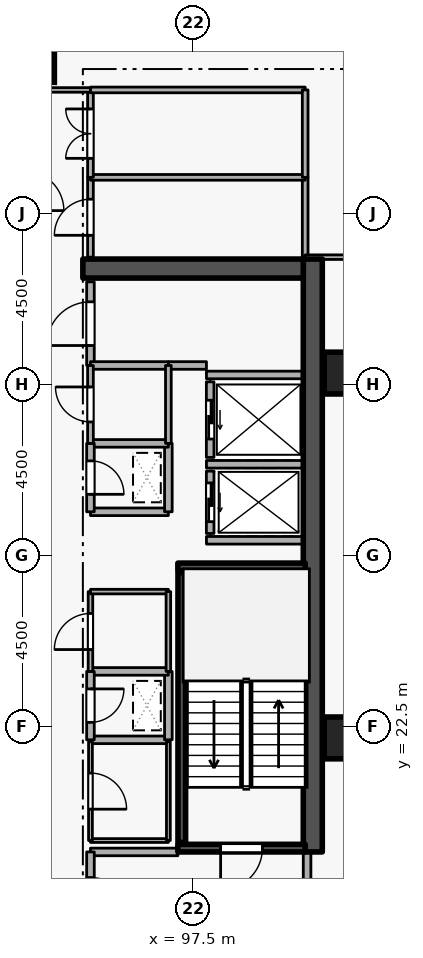
"""IFC4 building model, lengths in metres.
Left out: names, types, materials, properties, quantities, classifications, styles, units other than length and angle.
Written with IfcOpenShell. Run it as: python <this file> out.ifc"""

import sys

from ifc_helpers import new_model, si_unit, direction, frame, frame_2d, origin, origin_2d, place, context, subcontext, project, spatial, rectangle, extrude, element, fill, save


model = new_model("IFC4")
c1 = context("Model", 3, precision=1e-05, world=origin(), true_north=direction((0.0, 1.0)))
c2 = subcontext(c1, "Body", "Model", "MODEL_VIEW")
j1 = project(units=[si_unit("LENGTHUNIT", "METRE"), si_unit("PLANEANGLEUNIT", "RADIAN")], contexts=[c1])
p1 = place(None, origin())
s1 = spatial("IfcSite", under=j1, at=p1, CompositionType="ELEMENT")
p2 = place(p1, origin())
s2 = spatial("IfcBuilding", under=s1, at=p2, CompositionType="ELEMENT")
p3 = place(p2, frame((0.0, 0.0, 189.3)))
s3 = spatial("IfcBuildingStorey", under=s2, at=p3, CompositionType="ELEMENT", Elevation=189.3)
p4 = place(p3, frame((100.65, 19.2, 0.0), z_axis=(0.0, 0.0, 1.0), x_axis=(0.0, 1.0, 0.0)))
e1 = element("IfcWall", 1, at=p4, inside=s3, PredefinedType="SHEAR", context=c2, shape_type="SweptSolid", body=[
    extrude(rectangle(XDim=15.6, YDim=0.5, at=frame_2d((7.8, 0.0))), origin(), (0.0, 0.0, 1.0), 3.6),
])
p5 = place(p3, frame((94.6, 34.55, 0.0), z_axis=(0.0, 0.0, 1.0), x_axis=(1.0, 0.0, 0.0)))
e2 = element("IfcWall", 2, at=p5, inside=s3, PredefinedType="SHEAR", context=c2, shape_type="SweptSolid", body=[
    extrude(rectangle(XDim=5.8, YDim=0.5, at=frame_2d((2.9, 0.0))), origin(), (0.0, 0.0, 1.0), 3.6),
])
for number, where, z_axis, x_axis in (
    (3, (93.3, 40.0, 0.0), (0.0, 0.0, 1.0), (1.0, 0.0, 0.0)),
    (4, (101.5, 22.2, 0.0), (0.0, 0.0, 1.0), (1.0, 0.0, 0.0)),
    (5, (101.5, 31.8, 0.0), (0.0, 0.0, 1.0), (1.0, 0.0, 0.0)),
):
    element("IfcColumn", number, at=place(p3, frame(where, z_axis=z_axis, x_axis=x_axis)), inside=s3, PredefinedType="COLUMN", context=c2, shape_type="SweptSolid", body=[
        extrude(rectangle(XDim=1.1, YDim=1.1, at=origin_2d()), origin(), (0.0, 0.0, 1.0), 3.6),
    ])
p6 = place(p3, frame((97.95, 29.22, 0.0), z_axis=(0.0, 0.0, 1.0), x_axis=(0.0, -1.0, 0.0)))
e6 = element("IfcWall", 6, at=p6, inside=s3, PredefinedType="STANDARD", context=c2, shape_type="SweptSolid", body=[
    extrude(rectangle(XDim=1.64, YDim=0.2, at=frame_2d((0.82, 0.0))), origin(), (0.0, 0.0, 1.0), 3.34),
])
p7 = place(p6, frame((0.31, 0.0, 0.0)))
e7 = element("IfcOpeningElement", 7, at=p7, cuts=e6, PredefinedType="OPENING", context=c2, shape_type="SweptSolid", body=[
    extrude(rectangle(XDim=1.02, YDim=2.06, at=frame_2d((0.51, 1.03))), frame((0.0, 0.11, 0.0), z_axis=(0.0, -1.0, 0.0), x_axis=(1.0, 0.0, 0.0)), (0.0, 0.0, 1.0), 0.22),
])
p8 = place(p3, frame((97.95, 31.57, 0.0), z_axis=(0.0, 0.0, 1.0), x_axis=(0.0, -1.0, 0.0)))
e8 = element("IfcWall", 8, at=p8, inside=s3, PredefinedType="STANDARD", context=c2, shape_type="SweptSolid", body=[
    extrude(rectangle(XDim=1.99, YDim=0.2, at=frame_2d((0.995, 0.0))), origin(), (0.0, 0.0, 1.0), 3.34),
])
p9 = place(p8, frame((0.485, 0.0, 0.0)))
e9 = element("IfcOpeningElement", 9, at=p9, cuts=e8, PredefinedType="OPENING", context=c2, shape_type="SweptSolid", body=[
    extrude(rectangle(XDim=1.02, YDim=2.06, at=frame_2d((0.51, 1.03))), frame((0.0, 0.11, 0.0), z_axis=(0.0, -1.0, 0.0), x_axis=(1.0, 0.0, 0.0)), (0.0, 0.0, 1.0), 0.22),
])
for number, where, z_axis, x_axis in (
    (10, (97.852, 29.4, 0.0), (0.0, 0.0, 1.0), (1.0, 0.0, 0.0)),
    (11, (97.852, 27.4, 0.0), (0.0, 0.0, 1.0), (1.0, 0.0, 0.0)),
    (12, (97.852, 31.75, 0.0), (0.0, 0.0, 1.0), (1.0, 0.0, 0.0)),
):
    element("IfcWall", number, at=place(p3, frame(where, z_axis=z_axis, x_axis=x_axis)), inside=s3, PredefinedType="STANDARD", context=c2, shape_type="SweptSolid", body=[
        extrude(rectangle(XDim=2.536, YDim=0.2, at=frame_2d((1.268, 0.0))), origin(), (0.0, 0.0, 1.0), 3.34),
    ])
p10 = place(p3, frame((100.45, 19.3, 0.0), z_axis=(0.0, 0.0, 1.0), x_axis=(-1.0, 0.0, 0.0)))
e13 = element("IfcWall", 13, at=p10, inside=s3, PredefinedType="SHEAR", context=c2, shape_type="SweptSolid", body=[
    extrude(rectangle(XDim=3.35, YDim=0.2, at=frame_2d((1.675, 0.0))), origin(), (0.0, 0.0, 1.0), 3.6),
])
p11 = place(p10, frame((1.125, 0.0, 0.0)))
e14 = element("IfcOpeningElement", 14, at=p11, cuts=e13, PredefinedType="OPENING", context=c2, shape_type="SweptSolid", body=[
    extrude(rectangle(XDim=1.1, YDim=2.1, at=frame_2d((0.55, 1.05))), frame((0.0, 0.11, 0.0), z_axis=(0.0, -1.0, 0.0), x_axis=(1.0, 0.0, 0.0)), (0.0, 0.0, 1.0), 0.22),
])
p12 = place(p3, frame((97.1, 26.7, 0.0), z_axis=(0.0, 0.0, 1.0), x_axis=(1.0, 0.0, 0.0)))
e15 = element("IfcWall", 15, at=p12, inside=s3, PredefinedType="SHEAR", context=c2, shape_type="SweptSolid", body=[
    extrude(rectangle(XDim=3.35, YDim=0.2, at=frame_2d((1.675, 0.0))), origin(), (0.0, 0.0, 1.0), 3.6),
])
p13 = place(p3, frame((97.203, 26.55, 0.0), z_axis=(0.0, 0.0, 1.0), x_axis=(0.0, -1.0, 0.0)))
e16 = element("IfcWall", 16, at=p13, inside=s3, PredefinedType="SHEAR", context=c2, shape_type="SweptSolid", body=[
    extrude(rectangle(XDim=7.1, YDim=0.2, at=frame_2d((3.55, 0.0))), origin(), (0.0, 0.0, 1.0), 3.6),
])
p14 = place(p3, frame((100.5, 16.7, 0.0), z_axis=(0.0, 0.0, 1.0), x_axis=(0.0, 1.0, 0.0)))
e17 = element("IfcWall", 17, at=p14, inside=s3, PredefinedType="STANDARD", context=c2, shape_type="SweptSolid", body=[
    extrude(rectangle(XDim=2.5, YDim=0.2, at=frame_2d((1.25, 0.0))), origin(), (0.0, 0.0, 1.0), 3.34),
])
p15 = place(p3, frame((97.1, 19.2, 0.0), z_axis=(0.0, 0.0, 1.0), x_axis=(-1.0, 0.0, 0.0)))
e18 = element("IfcWall", 18, at=p15, inside=s3, PredefinedType="STANDARD", context=c2, shape_type="SweptSolid", body=[
    extrude(rectangle(XDim=2.3, YDim=0.2, at=frame_2d((1.15, 0.0))), origin(), (0.0, 0.0, 1.0), 2.545),
])
p16 = place(p3, frame((94.8, 19.2, 0.0), z_axis=(0.0, 0.0, 1.0), x_axis=(0.0, -1.0, 0.0)))
e19 = element("IfcWall", 19, at=p16, inside=s3, PredefinedType="STANDARD", context=c2, shape_type="SweptSolid", body=[
    extrude(rectangle(XDim=2.5, YDim=0.2, at=frame_2d((1.25, 0.0))), origin(), (0.0, 0.0, 1.0), 3.34),
])
p17 = place(p16, frame((0.675, 0.0, 0.0)))
e20 = element("IfcOpeningElement", 20, at=p17, cuts=e19, PredefinedType="OPENING", context=c2, shape_type="SweptSolid", body=[
    extrude(rectangle(XDim=1.15, YDim=2.1, at=frame_2d((0.575, 1.05))), frame((0.0, 0.11, 0.0), z_axis=(0.0, -1.0, 0.0), x_axis=(1.0, 0.0, 0.0)), (0.0, 0.0, 1.0), 0.22),
])
p18 = place(p3, frame((94.8, 28.15, 0.0), z_axis=(0.0, 0.0, 1.0), x_axis=(1.0, 0.0, 0.0)))
e21 = element("IfcWall", 21, at=p18, inside=s3, PredefinedType="STANDARD", context=c2, shape_type="SweptSolid", body=[
    extrude(rectangle(XDim=2.05, YDim=0.2, at=frame_2d((1.025, 0.0))), origin(), (0.0, 0.0, 1.0), 3.34),
])
p19 = place(p3, frame((96.85, 28.15, 0.0), z_axis=(0.0, 0.0, 1.0), x_axis=(0.0, 1.0, 0.0)))
e22 = element("IfcWall", 22, at=p19, inside=s3, PredefinedType="STANDARD", context=c2, shape_type="SweptSolid", body=[
    extrude(rectangle(XDim=1.8, YDim=0.2, at=frame_2d((0.9, 0.0))), origin(), (0.0, 0.0, 1.0), 3.34),
])
p20 = place(p3, frame((96.85, 29.95, 0.0), z_axis=(0.0, 0.0, 1.0), x_axis=(-1.0, 0.0, 0.0)))
e23 = element("IfcWall", 23, at=p20, inside=s3, PredefinedType="STANDARD", context=c2, shape_type="SweptSolid", body=[
    extrude(rectangle(XDim=2.05, YDim=0.2, at=frame_2d((1.025, 0.0))), origin(), (0.0, 0.0, 1.0), 3.34),
])
p21 = place(p3, frame((94.8, 29.95, 0.0), z_axis=(0.0, 0.0, 1.0), x_axis=(0.0, -1.0, 0.0)))
e24 = element("IfcWall", 24, at=p21, inside=s3, PredefinedType="STANDARD", context=c2, shape_type="SweptSolid", body=[
    extrude(rectangle(XDim=1.8, YDim=0.2, at=frame_2d((0.9, 0.0))), origin(), (0.0, 0.0, 1.0), 3.34),
])
p22 = place(p21, frame((0.46, 0.0, 0.0)))
e25 = element("IfcOpeningElement", 25, at=p22, cuts=e24, PredefinedType="OPENING", context=c2, shape_type="SweptSolid", body=[
    extrude(rectangle(XDim=0.88, YDim=2.04, at=frame_2d((0.44, 1.02))), frame((0.0, 0.11, 0.0), z_axis=(0.0, -1.0, 0.0), x_axis=(1.0, 0.0, 0.0)), (0.0, 0.0, 1.0), 0.22),
])
p23 = place(p3, frame((94.8, 22.15, 0.0), z_axis=(0.0, 0.0, 1.0), x_axis=(1.0, 0.0, 0.0)))
e26 = element("IfcWall", 26, at=p23, inside=s3, PredefinedType="STANDARD", context=c2, shape_type="SweptSolid", body=[
    extrude(rectangle(XDim=2.05, YDim=0.2, at=frame_2d((1.025, 0.0))), origin(), (0.0, 0.0, 1.0), 3.34),
])
p24 = place(p3, frame((96.85, 22.15, 0.0), z_axis=(0.0, 0.0, 1.0), x_axis=(0.0, 1.0, 0.0)))
e27 = element("IfcWall", 27, at=p24, inside=s3, PredefinedType="STANDARD", context=c2, shape_type="SweptSolid", body=[
    extrude(rectangle(XDim=1.8, YDim=0.2, at=frame_2d((0.9, 0.0))), origin(), (0.0, 0.0, 1.0), 3.34),
])
p25 = place(p3, frame((96.85, 23.95, 0.0), z_axis=(0.0, 0.0, 1.0), x_axis=(-1.0, 0.0, 0.0)))
e28 = element("IfcWall", 28, at=p25, inside=s3, PredefinedType="STANDARD", context=c2, shape_type="SweptSolid", body=[
    extrude(rectangle(XDim=2.05, YDim=0.2, at=frame_2d((1.025, 0.0))), origin(), (0.0, 0.0, 1.0), 3.34),
])
p26 = place(p3, frame((94.8, 23.95, 0.0), z_axis=(0.0, 0.0, 1.0), x_axis=(0.0, -1.0, 0.0)))
e29 = element("IfcWall", 29, at=p26, inside=s3, PredefinedType="STANDARD", context=c2, shape_type="SweptSolid", body=[
    extrude(rectangle(XDim=1.8, YDim=0.2, at=frame_2d((0.9, 0.0))), origin(), (0.0, 0.0, 1.0), 3.34),
])
p27 = place(p26, frame((0.46, 0.0, 0.0)))
e30 = element("IfcOpeningElement", 30, at=p27, cuts=e29, PredefinedType="OPENING", context=c2, shape_type="SweptSolid", body=[
    extrude(rectangle(XDim=0.88, YDim=2.04, at=frame_2d((0.44, 1.02))), frame((0.0, 0.11, 0.0), z_axis=(0.0, -1.0, 0.0), x_axis=(1.0, 0.0, 0.0)), (0.0, 0.0, 1.0), 0.22),
])
p28 = place(p3, frame((94.8, 32.0, 0.0), z_axis=(0.0, 0.0, 1.0), x_axis=(0.0, 1.0, 0.0)))
e31 = element("IfcWall", 31, at=p28, inside=s3, PredefinedType="STANDARD", context=c2, shape_type="SweptSolid", body=[
    extrude(rectangle(XDim=2.2, YDim=0.2, at=frame_2d((1.1, 0.0))), origin(), (0.0, 0.0, 1.0), 3.34),
])
p29 = place(p28, frame((0.525, 0.0, 0.0)))
e32 = element("IfcOpeningElement", 32, at=p29, cuts=e31, PredefinedType="OPENING", context=c2, shape_type="SweptSolid", body=[
    extrude(rectangle(XDim=1.15, YDim=2.1, at=frame_2d((0.575, 1.05))), frame((0.0, 0.11, 0.0), z_axis=(0.0, -1.0, 0.0), x_axis=(1.0, 0.0, 0.0)), (0.0, 0.0, 1.0), 0.22),
])
p30 = place(p3, frame((97.852, 32.0, 0.0), z_axis=(0.0, 0.0, 1.0), x_axis=(-1.0, 0.0, 0.0)))
e33 = element("IfcWall", 33, at=p30, inside=s3, PredefinedType="STANDARD", context=c2, shape_type="SweptSolid", body=[
    extrude(rectangle(XDim=1.002, YDim=0.2, at=frame_2d((0.501, 0.0))), origin(), (0.0, 0.0, 1.0), 3.34),
])
p31 = place(p3, frame((96.85, 32.0, 0.0), z_axis=(0.0, 0.0, 1.0), x_axis=(-1.0, 0.0, 0.0)))
e34 = element("IfcWall", 34, at=p31, inside=s3, PredefinedType="STANDARD", context=c2, shape_type="SweptSolid", body=[
    extrude(rectangle(XDim=2.05, YDim=0.2, at=frame_2d((1.025, 0.0))), origin(), (0.0, 0.0, 1.0), 3.34),
])
p32 = place(p3, frame((94.8, 19.5, 0.0), z_axis=(0.0, 0.0, 1.0), x_axis=(1.0, 0.0, 0.0)))
e35 = element("IfcWall", 35, at=p32, inside=s3, PredefinedType="PARTITIONING", context=c2, shape_type="SweptSolid", body=[
    extrude(rectangle(XDim=2.05, YDim=0.1, at=frame_2d((1.025, 0.0))), origin(), (0.0, 0.0, 1.0), 2.545),
])
p33 = place(p3, frame((96.85, 19.5, 0.0), z_axis=(0.0, 0.0, 1.0), x_axis=(0.0, 1.0, 0.0)))
e36 = element("IfcWall", 36, at=p33, inside=s3, PredefinedType="PARTITIONING", context=c2, shape_type="SweptSolid", body=[
    extrude(rectangle(XDim=2.6, YDim=0.1, at=frame_2d((1.3, 0.0))), origin(), (0.0, 0.0, 1.0), 3.34),
])
p34 = place(p3, frame((94.8, 22.1, 0.0), z_axis=(0.0, 0.0, 1.0), x_axis=(0.0, -1.0, 0.0)))
e37 = element("IfcWall", 37, at=p34, inside=s3, PredefinedType="PARTITIONING", context=c2, shape_type="SweptSolid", body=[
    extrude(rectangle(XDim=2.6, YDim=0.1, at=frame_2d((1.3, 0.0))), origin(), (0.0, 0.0, 1.0), 3.34),
])
p35 = place(p34, frame((0.825, 0.0, 0.0)))
e38 = element("IfcOpeningElement", 38, at=p35, cuts=e37, PredefinedType="OPENING", context=c2, shape_type="SweptSolid", body=[
    extrude(rectangle(XDim=0.95, YDim=2.1, at=frame_2d((0.475, 1.05))), frame((0.0, 0.06, 0.0), z_axis=(0.0, -1.0, 0.0), x_axis=(1.0, 0.0, 0.0)), (0.0, 0.0, 1.0), 0.12),
])
p36 = place(p3, frame((94.8, 23.95, 0.0), z_axis=(0.0, 0.0, 1.0), x_axis=(0.0, 1.0, 0.0)))
e39 = element("IfcWall", 39, at=p36, inside=s3, PredefinedType="PARTITIONING", context=c2, shape_type="SweptSolid", body=[
    extrude(rectangle(XDim=2.1, YDim=0.12, at=frame_2d((1.05, 0.0))), origin(), (0.0, 0.0, 1.0), 3.34),
])
p37 = place(p36, frame((0.575, 0.0, 0.0)))
e40 = element("IfcOpeningElement", 40, at=p37, cuts=e39, PredefinedType="OPENING", context=c2, shape_type="SweptSolid", body=[
    extrude(rectangle(XDim=0.95, YDim=2.1, at=frame_2d((0.475, 1.05))), frame((0.0, 0.07, 0.0), z_axis=(0.0, -1.0, 0.0), x_axis=(1.0, 0.0, 0.0)), (0.0, 0.0, 1.0), 0.14),
])
p38 = place(p3, frame((94.8, 26.05, 0.0), z_axis=(0.0, 0.0, 1.0), x_axis=(1.0, 0.0, 0.0)))
e41 = element("IfcWall", 41, at=p38, inside=s3, PredefinedType="PARTITIONING", context=c2, shape_type="SweptSolid", body=[
    extrude(rectangle(XDim=2.05, YDim=0.12, at=frame_2d((1.025, 0.0))), origin(), (0.0, 0.0, 1.0), 3.34),
])
p39 = place(p3, frame((96.85, 26.05, 0.0), z_axis=(0.0, 0.0, 1.0), x_axis=(0.0, -1.0, 0.0)))
e42 = element("IfcWall", 42, at=p39, inside=s3, PredefinedType="PARTITIONING", context=c2, shape_type="SweptSolid", body=[
    extrude(rectangle(XDim=2.1, YDim=0.12, at=frame_2d((1.05, 0.0))), origin(), (0.0, 0.0, 1.0), 3.34),
])
p40 = place(p3, frame((94.8, 29.95, 0.0), z_axis=(0.0, 0.0, 1.0), x_axis=(0.0, 1.0, 0.0)))
e43 = element("IfcWall", 43, at=p40, inside=s3, PredefinedType="PARTITIONING", context=c2, shape_type="SweptSolid", body=[
    extrude(rectangle(XDim=2.05, YDim=0.15, at=frame_2d((1.025, 0.0))), origin(), (0.0, 0.0, 1.0), 3.34),
])
p41 = place(p40, frame((0.565, 0.0, 0.0)))
e44 = element("IfcOpeningElement", 44, at=p41, cuts=e43, PredefinedType="OPENING", context=c2, shape_type="SweptSolid", body=[
    extrude(rectangle(XDim=0.92, YDim=2.08, at=frame_2d((0.46, 1.04))), frame((0.0, 0.085, 0.0), z_axis=(0.0, -1.0, 0.0), x_axis=(1.0, 0.0, 0.0)), (0.0, 0.0, 1.0), 0.17),
])
p42 = place(p3, frame((96.85, 32.0, 0.0), z_axis=(0.0, 0.0, 1.0), x_axis=(0.0, -1.0, 0.0)))
e45 = element("IfcWall", 45, at=p42, inside=s3, PredefinedType="PARTITIONING", context=c2, shape_type="SweptSolid", body=[
    extrude(rectangle(XDim=2.05, YDim=0.15, at=frame_2d((1.025, 0.0))), origin(), (0.0, 0.0, 1.0), 3.34),
])
p43 = place(p3, frame((100.45, 36.95, 0.0), z_axis=(0.0, 0.0, 1.0), x_axis=(0.0, -1.0, 0.0)))
e46 = element("IfcWall", 46, at=p43, inside=s3, PredefinedType="PARTITIONING", context=c2, shape_type="SweptSolid", body=[
    extrude(rectangle(XDim=2.1, YDim=0.15, at=frame_2d((1.05, 0.0))), origin(), (0.0, 0.0, 1.0), 3.34),
])
p44 = place(p3, frame((94.8, 34.85, 0.0), z_axis=(0.0, 0.0, 1.0), x_axis=(0.0, 1.0, 0.0)))
e47 = element("IfcWall", 47, at=p44, inside=s3, PredefinedType="PARTITIONING", context=c2, shape_type="SweptSolid", body=[
    extrude(rectangle(XDim=2.1, YDim=0.15, at=frame_2d((1.05, 0.0))), origin(), (0.0, 0.0, 1.0), 3.34),
])
p45 = place(p44, frame((0.575, 0.0, 0.0)))
e48 = element("IfcOpeningElement", 48, at=p45, cuts=e47, PredefinedType="OPENING", context=c2, shape_type="SweptSolid", body=[
    extrude(rectangle(XDim=0.95, YDim=2.1, at=frame_2d((0.475, 1.05))), frame((0.0, 0.085, 0.0), z_axis=(0.0, -1.0, 0.0), x_axis=(1.0, 0.0, 0.0)), (0.0, 0.0, 1.0), 0.17),
])
p46 = place(p3, frame((94.8, 36.95, 0.0), z_axis=(0.0, 0.0, 1.0), x_axis=(1.0, 0.0, 0.0)))
e49 = element("IfcWall", 49, at=p46, inside=s3, PredefinedType="PARTITIONING", context=c2, shape_type="SweptSolid", body=[
    extrude(rectangle(XDim=5.65, YDim=0.15, at=frame_2d((2.825, 0.0))), origin(), (0.0, 0.0, 1.0), 3.34),
])
p47 = place(p3, frame((94.8, 36.95, 0.0), z_axis=(0.0, 0.0, 1.0), x_axis=(0.0, 1.0, 0.0)))
e50 = element("IfcWall", 50, at=p47, inside=s3, PredefinedType="PARTITIONING", context=c2, shape_type="SweptSolid", body=[
    extrude(rectangle(XDim=2.3, YDim=0.15, at=frame_2d((1.15, 0.0))), origin(), (0.0, 0.0, 1.0), 3.34),
])
p48 = place(p47, frame((0.5, 0.0, 0.0)))
e51 = element("IfcOpeningElement", 51, at=p48, cuts=e50, PredefinedType="OPENING", context=c2, shape_type="SweptSolid", body=[
    extrude(rectangle(XDim=1.3, YDim=2.12, at=frame_2d((0.65, 1.06))), frame((0.0, 0.085, 0.0), z_axis=(0.0, -1.0, 0.0), x_axis=(1.0, 0.0, 0.0)), (0.0, 0.0, 1.0), 0.17),
])
p49 = place(p3, frame((94.8, 39.25, 0.0), z_axis=(0.0, 0.0, 1.0), x_axis=(1.0, 0.0, 0.0)))
e52 = element("IfcWall", 52, at=p49, inside=s3, PredefinedType="PARTITIONING", context=c2, shape_type="SweptSolid", body=[
    extrude(rectangle(XDim=5.65, YDim=0.15, at=frame_2d((2.825, 0.0))), origin(), (0.0, 0.0, 1.0), 3.34),
])
p50 = place(p3, frame((100.45, 39.25, 0.0), z_axis=(0.0, 0.0, 1.0), x_axis=(0.0, -1.0, 0.0)))
e53 = element("IfcWall", 53, at=p50, inside=s3, PredefinedType="PARTITIONING", context=c2, shape_type="SweptSolid", body=[
    extrude(rectangle(XDim=2.3, YDim=0.15, at=frame_2d((1.15, 0.0))), origin(), (0.0, 0.0, 1.0), 3.34),
])
p51 = place(p3, frame((94.8, 39.25, 0.0), z_axis=(0.0, 0.0, 1.0), x_axis=(-1.0, 0.0, 0.0)))
e54 = element("IfcWall", 54, at=p51, inside=s3, PredefinedType="PARTITIONING", context=c2, shape_type="SweptSolid", body=[
    extrude(rectangle(XDim=1.75, YDim=0.12, at=frame_2d((0.875, 0.0))), origin(), (0.0, 0.0, 1.0), 3.34),
])
p52 = place(p3, frame((106.22, 34.85, 0.0), z_axis=(0.0, 0.0, 1.0), x_axis=(-1.0, 0.0, 0.0)))
e55 = element("IfcWall", 55, at=p52, inside=s3, PredefinedType="PARTITIONING", context=c2, shape_type="SweptSolid", body=[
    extrude(rectangle(XDim=5.77, YDim=0.12, at=frame_2d((2.885, 0.0))), origin(), (0.0, 0.0, 1.0), 2.545),
])
p53 = place(p7, origin())
e56 = element("IfcDoor", 56, at=p53, inside=s3, OperationType="SLIDING_TO_LEFT", PredefinedType="DOOR", context=c2, shape_type="SweptSolid", body=[
    extrude(rectangle(XDim=1.02, YDim=2.06, at=frame_2d((0.51, 1.03))), frame((0.0, 0.025, 0.0), z_axis=(0.0, -1.0, 0.0), x_axis=(1.0, 0.0, 0.0)), (0.0, 0.0, 1.0), 0.05),
])
fill(e7, e56)
p54 = place(p9, origin())
e57 = element("IfcDoor", 57, at=p54, inside=s3, OperationType="SLIDING_TO_LEFT", PredefinedType="DOOR", context=c2, shape_type="SweptSolid", body=[
    extrude(rectangle(XDim=1.02, YDim=2.06, at=frame_2d((0.51, 1.03))), frame((0.0, 0.025, 0.0), z_axis=(0.0, -1.0, 0.0), x_axis=(1.0, 0.0, 0.0)), (0.0, 0.0, 1.0), 0.05),
])
fill(e9, e57)
p55 = place(p11, origin())
e58 = element("IfcDoor", 58, at=p55, inside=s3, OperationType="SINGLE_SWING_RIGHT", PredefinedType="DOOR", context=c2, shape_type="SweptSolid", body=[
    extrude(rectangle(XDim=1.1, YDim=2.1, at=frame_2d((0.55, 1.05))), frame((0.0, 0.025, 0.0), z_axis=(0.0, -1.0, 0.0), x_axis=(1.0, 0.0, 0.0)), (0.0, 0.0, 1.0), 0.05),
])
fill(e14, e58)
p56 = place(p17, origin())
e59 = element("IfcDoor", 59, at=p56, inside=s3, OperationType="SINGLE_SWING_RIGHT", PredefinedType="DOOR", context=c2, shape_type="SweptSolid", body=[
    extrude(rectangle(XDim=1.15, YDim=2.1, at=frame_2d((0.575, 1.05))), frame((0.0, 0.025, 0.0), z_axis=(0.0, -1.0, 0.0), x_axis=(1.0, 0.0, 0.0)), (0.0, 0.0, 1.0), 0.05),
])
fill(e20, e59)
p57 = place(p22, origin())
e60 = element("IfcDoor", 60, at=p57, inside=s3, OperationType="SINGLE_SWING_RIGHT", PredefinedType="DOOR", context=c2, shape_type="SweptSolid", body=[
    extrude(rectangle(XDim=0.88, YDim=2.04, at=frame_2d((0.44, 1.02))), frame((0.0, 0.025, 0.0), z_axis=(0.0, -1.0, 0.0), x_axis=(1.0, 0.0, 0.0)), (0.0, 0.0, 1.0), 0.05),
])
fill(e25, e60)
p58 = place(p27, origin())
e61 = element("IfcDoor", 61, at=p58, inside=s3, OperationType="SINGLE_SWING_LEFT", PredefinedType="DOOR", context=c2, shape_type="SweptSolid", body=[
    extrude(rectangle(XDim=0.88, YDim=2.04, at=frame_2d((0.44, 1.02))), frame((0.0, 0.025, 0.0), z_axis=(0.0, -1.0, 0.0), x_axis=(1.0, 0.0, 0.0)), (0.0, 0.0, 1.0), 0.05),
])
fill(e30, e61)
p59 = place(p35, origin())
e62 = element("IfcDoor", 62, at=p59, inside=s3, OperationType="SINGLE_SWING_RIGHT", PredefinedType="DOOR", context=c2, shape_type="SweptSolid", body=[
    extrude(rectangle(XDim=0.95, YDim=2.1, at=frame_2d((0.475, 1.05))), frame((0.0, 0.025, 0.0), z_axis=(0.0, -1.0, 0.0), x_axis=(1.0, 0.0, 0.0)), (0.0, 0.0, 1.0), 0.05),
])
fill(e38, e62)
p60 = place(p37, origin())
e63 = element("IfcDoor", 63, at=p60, inside=s3, OperationType="SINGLE_SWING_LEFT", PredefinedType="DOOR", context=c2, shape_type="SweptSolid", body=[
    extrude(rectangle(XDim=0.95, YDim=2.1, at=frame_2d((0.475, 1.05))), frame((0.0, 0.025, 0.0), z_axis=(0.0, -1.0, 0.0), x_axis=(1.0, 0.0, 0.0)), (0.0, 0.0, 1.0), 0.05),
])
fill(e40, e63)
p61 = place(p41, origin())
e64 = element("IfcDoor", 64, at=p61, inside=s3, OperationType="SINGLE_SWING_RIGHT", PredefinedType="DOOR", context=c2, shape_type="SweptSolid", body=[
    extrude(rectangle(XDim=0.92, YDim=2.08, at=frame_2d((0.46, 1.04))), frame((0.0, 0.025, 0.0), z_axis=(0.0, -1.0, 0.0), x_axis=(1.0, 0.0, 0.0)), (0.0, 0.0, 1.0), 0.05),
])
fill(e44, e64)
p62 = place(p29, origin())
e65 = element("IfcDoor", 65, at=p62, inside=s3, OperationType="SINGLE_SWING_LEFT", PredefinedType="DOOR", context=c2, shape_type="SweptSolid", body=[
    extrude(rectangle(XDim=1.15, YDim=2.1, at=frame_2d((0.575, 1.05))), frame((0.0, 0.025, 0.0), z_axis=(0.0, -1.0, 0.0), x_axis=(1.0, 0.0, 0.0)), (0.0, 0.0, 1.0), 0.05),
])
fill(e32, e65)
p63 = place(p45, origin())
e66 = element("IfcDoor", 66, at=p63, inside=s3, OperationType="SINGLE_SWING_LEFT", PredefinedType="DOOR", context=c2, shape_type="SweptSolid", body=[
    extrude(rectangle(XDim=0.95, YDim=2.1, at=frame_2d((0.475, 1.05))), frame((0.0, 0.025, 0.0), z_axis=(0.0, -1.0, 0.0), x_axis=(1.0, 0.0, 0.0)), (0.0, 0.0, 1.0), 0.05),
])
fill(e48, e66)
p64 = place(p48, origin())
e67 = element("IfcDoor", 67, at=p64, inside=s3, OperationType="DOUBLE_DOOR_SINGLE_SWING", PredefinedType="DOOR", context=c2, shape_type="SweptSolid", body=[
    extrude(rectangle(XDim=1.3, YDim=2.12, at=frame_2d((0.65, 1.06))), frame((0.0, 0.025, 0.0), z_axis=(0.0, -1.0, 0.0), x_axis=(1.0, 0.0, 0.0)), (0.0, 0.0, 1.0), 0.05),
])
fill(e51, e67)
save(model, sys.argv[1])
